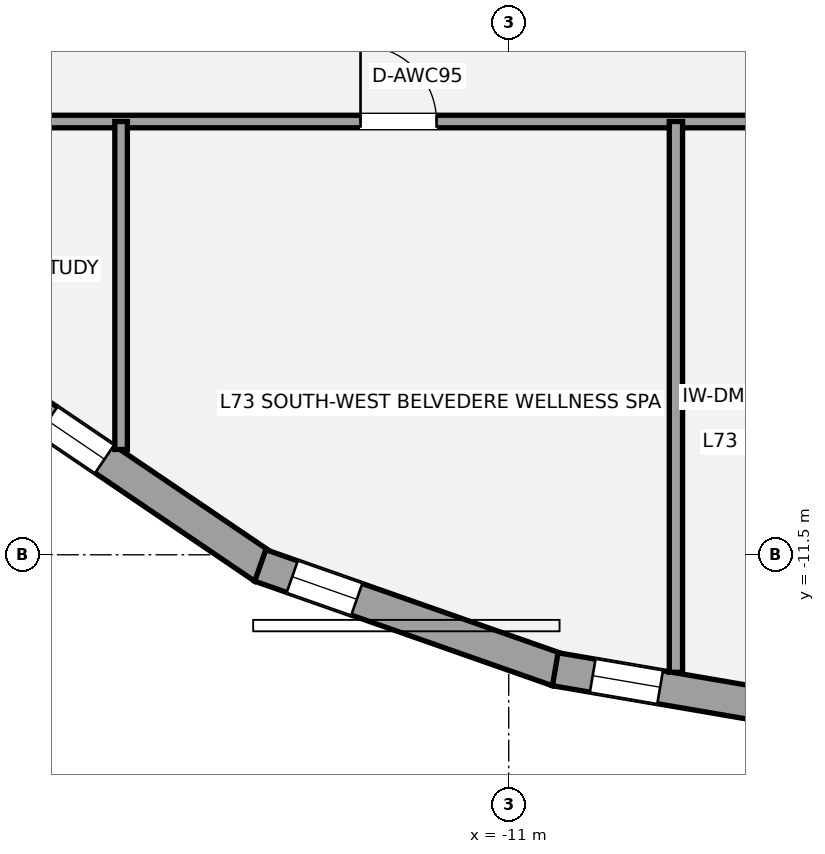
"""IFC4 building model, lengths in metres.
Left out: names, types, materials, properties, quantities, classifications, styles, units other than length and angle.
Written with IfcOpenShell. Run it as: python <this file> out.ifc"""

import sys

from ifc_helpers import new_model, si_unit, direction, frame, frame_2d, origin, place, context, subcontext, project, spatial, rectangle, extrude, element, fill, save


model = new_model("IFC4")
c1 = context("Model", 3, precision=1e-05, world=origin(), true_north=direction((0.0, 1.0)))
c2 = subcontext(c1, "Body", "Model", "MODEL_VIEW")
j1 = project(units=[si_unit("LENGTHUNIT", "METRE"), si_unit("PLANEANGLEUNIT", "RADIAN")], contexts=[c1])
p1 = place(None, origin())
s1 = spatial("IfcSite", under=j1, at=p1, CompositionType="ELEMENT")
p2 = place(p1, origin())
s2 = spatial("IfcBuilding", under=s1, at=p2, CompositionType="ELEMENT")
p3 = place(p2, frame((0.0, 0.0, 257.25)))
s3 = spatial("IfcBuildingStorey", under=s2, at=p3, CompositionType="ELEMENT", Elevation=257.25)
p4 = place(p3, frame((-14.218, -11.666, 0.0), z_axis=(0.0, 0.0, 1.0), x_axis=(-0.827669406477, 0.561215959842, 0.0)))
e1 = element("IfcWall", 1, at=p4, inside=s3, PredefinedType="STANDARD", context=c2, shape_type="SweptSolid", body=[
    extrude(rectangle(XDim=3.786, YDim=0.44, at=frame_2d((1.893, 0.0))), origin(), (0.0, 0.0, 1.0), 2.296),
])
p5 = place(p4, frame((2.537, 0.0, 0.58)))
e2 = element("IfcOpeningElement", 2, at=p5, cuts=e1, PredefinedType="OPENING", context=c2, shape_type="SweptSolid", body=[
    extrude(rectangle(XDim=0.9, YDim=1.35, at=frame_2d((0.45, 0.675))), frame((0.0, 0.23, 0.0), z_axis=(0.0, -1.0, 0.0), x_axis=(1.0, 0.0, 0.0)), (0.0, 0.0, 1.0), 0.46),
])
p6 = place(p3, frame((-10.352, -13.015, 0.0), z_axis=(0.0, 0.0, 1.0), x_axis=(-0.943571934891, 0.331167636834, 0.0)))
e3 = element("IfcWall", 3, at=p6, inside=s3, PredefinedType="STANDARD", context=c2, shape_type="SweptSolid", body=[
    extrude(rectangle(XDim=4.151, YDim=0.44, at=frame_2d((2.076, 0.0))), origin(), (0.0, 0.0, 1.0), 2.296),
])
p7 = place(p6, frame((2.805, 0.0, 0.58)))
e4 = element("IfcOpeningElement", 4, at=p7, cuts=e3, PredefinedType="OPENING", context=c2, shape_type="SweptSolid", body=[
    extrude(rectangle(XDim=0.9, YDim=1.35, at=frame_2d((0.45, 0.675))), frame((0.0, 0.23, 0.0), z_axis=(0.0, -1.0, 0.0), x_axis=(1.0, 0.0, 0.0)), (0.0, 0.0, 1.0), 0.46),
])
p8 = place(p3, frame((-6.2, -13.723, 0.0), z_axis=(0.0, 0.0, 1.0), x_axis=(-0.985667057966, 0.168702254995, 0.0)))
e5 = element("IfcWall", 5, at=p8, inside=s3, PredefinedType="STANDARD", context=c2, shape_type="SweptSolid", body=[
    extrude(rectangle(XDim=4.249, YDim=0.44, at=frame_2d((2.125, 0.0))), origin(), (0.0, 0.0, 1.0), 2.296),
])
p9 = place(p8, frame((2.849, 0.0, 0.58)))
e6 = element("IfcOpeningElement", 6, at=p9, cuts=e5, PredefinedType="OPENING", context=c2, shape_type="SweptSolid", body=[
    extrude(rectangle(XDim=0.9, YDim=1.35, at=frame_2d((0.45, 0.675))), frame((0.0, 0.23, 0.0), z_axis=(0.0, -1.0, 0.0), x_axis=(1.0, 0.0, 0.0)), (0.0, 0.0, 1.0), 0.46),
])
p10 = place(p3, frame((-19.497, -5.8, 0.0), z_axis=(0.0, 0.0, 1.0), x_axis=(1.0, 0.0, 0.0)))
e7 = element("IfcWall", 7, at=p10, inside=s3, PredefinedType="PARTITIONING", context=c2, shape_type="SweptSolid", body=[
    extrude(rectangle(XDim=38.994, YDim=0.165, at=frame_2d((19.497, 0.0))), origin(), (0.0, 0.0, 1.0), 2.383),
])
p11 = place(p10, frame((1.035, 0.0, 0.0)))
e8 = element("IfcOpeningElement", 8, at=p11, cuts=e7, PredefinedType="OPENING", context=c2, shape_type="SweptSolid", body=[
    extrude(rectangle(XDim=1.0, YDim=2.15, at=frame_2d((0.5, 1.075))), frame((0.0, 0.093, 0.0), z_axis=(0.0, -1.0, 0.0), x_axis=(1.0, 0.0, 0.0)), (0.0, 0.0, 1.0), 0.185),
])
p12 = place(p10, frame((36.719, 0.0, 0.0)))
e9 = element("IfcOpeningElement", 9, at=p12, cuts=e7, PredefinedType="OPENING", context=c2, shape_type="SweptSolid", body=[
    extrude(rectangle(XDim=1.0, YDim=2.15, at=frame_2d((0.5, 1.075))), frame((0.0, 0.093, 0.0), z_axis=(0.0, -1.0, 0.0), x_axis=(1.0, 0.0, 0.0)), (0.0, 0.0, 1.0), 0.185),
])
p13 = place(p10, frame((6.548, 0.0, 0.0)))
e10 = element("IfcOpeningElement", 10, at=p13, cuts=e7, PredefinedType="OPENING", context=c2, shape_type="SweptSolid", body=[
    extrude(rectangle(XDim=1.0, YDim=2.15, at=frame_2d((0.5, 1.075))), frame((0.0, 0.093, 0.0), z_axis=(0.0, -1.0, 0.0), x_axis=(1.0, 0.0, 0.0)), (0.0, 0.0, 1.0), 0.185),
])
p14 = place(p10, frame((13.778, 0.0, 0.0)))
e11 = element("IfcOpeningElement", 11, at=p14, cuts=e7, PredefinedType="OPENING", context=c2, shape_type="SweptSolid", body=[
    extrude(rectangle(XDim=1.0, YDim=2.15, at=frame_2d((0.5, 1.075))), frame((0.0, 0.093, 0.0), z_axis=(0.0, -1.0, 0.0), x_axis=(1.0, 0.0, 0.0)), (0.0, 0.0, 1.0), 0.185),
])
p15 = place(p10, frame((19.397, 0.0, 0.0)))
e12 = element("IfcOpeningElement", 12, at=p15, cuts=e7, PredefinedType="OPENING", context=c2, shape_type="SweptSolid", body=[
    extrude(rectangle(XDim=1.0, YDim=2.15, at=frame_2d((0.5, 1.075))), frame((0.0, 0.093, 0.0), z_axis=(0.0, -1.0, 0.0), x_axis=(1.0, 0.0, 0.0)), (0.0, 0.0, 1.0), 0.185),
])
p16 = place(p10, frame((26.018, 0.0, 0.0)))
e13 = element("IfcOpeningElement", 13, at=p16, cuts=e7, PredefinedType="OPENING", context=c2, shape_type="SweptSolid", body=[
    extrude(rectangle(XDim=1.0, YDim=2.15, at=frame_2d((0.5, 1.075))), frame((0.0, 0.093, 0.0), z_axis=(0.0, -1.0, 0.0), x_axis=(1.0, 0.0, 0.0)), (0.0, 0.0, 1.0), 0.185),
])
p17 = place(p10, frame((31.647, 0.0, 0.0)))
e14 = element("IfcOpeningElement", 14, at=p17, cuts=e7, PredefinedType="OPENING", context=c2, shape_type="SweptSolid", body=[
    extrude(rectangle(XDim=1.0, YDim=2.15, at=frame_2d((0.5, 1.075))), frame((0.0, 0.093, 0.0), z_axis=(0.0, -1.0, 0.0), x_axis=(1.0, 0.0, 0.0)), (0.0, 0.0, 1.0), 0.185),
])
p18 = place(p3, frame((-16.1, -10.115, 0.0), z_axis=(0.0, 0.0, 1.0), x_axis=(0.0, 1.0, 0.0)))
e15 = element("IfcWall", 15, at=p18, inside=s3, PredefinedType="PARTITIONING", context=c2, shape_type="SweptSolid", body=[
    extrude(rectangle(XDim=4.314, YDim=0.165, at=frame_2d((2.157, 0.0))), origin(), (0.0, 0.0, 1.0), 2.383),
])
p19 = place(p3, frame((-8.8, -13.046, 0.0), z_axis=(0.0, 0.0, 1.0), x_axis=(0.0, 1.0, 0.0)))
e16 = element("IfcWall", 16, at=p19, inside=s3, PredefinedType="PARTITIONING", context=c2, shape_type="SweptSolid", body=[
    extrude(rectangle(XDim=7.246, YDim=0.175, at=frame_2d((3.623, 0.0))), origin(), (0.0, 0.0, 1.0), 2.93),
])
p20 = place(p5, origin())
e17 = element("IfcWindow", 17, at=p20, inside=s3, PartitioningType="SINGLE_PANEL", PredefinedType="WINDOW", context=c2, shape_type="SweptSolid", body=[
    extrude(rectangle(XDim=0.9, YDim=1.35, at=frame_2d((0.45, 0.675))), frame((0.0, -0.01, 0.0), z_axis=(0.0, -1.0, 0.0), x_axis=(1.0, 0.0, 0.0)), (0.0, 0.0, 1.0), 0.06),
])
fill(e2, e17)
p21 = place(p7, origin())
e18 = element("IfcWindow", 18, at=p21, inside=s3, PartitioningType="SINGLE_PANEL", PredefinedType="WINDOW", context=c2, shape_type="SweptSolid", body=[
    extrude(rectangle(XDim=0.9, YDim=1.35, at=frame_2d((0.45, 0.675))), frame((0.0, -0.01, 0.0), z_axis=(0.0, -1.0, 0.0), x_axis=(1.0, 0.0, 0.0)), (0.0, 0.0, 1.0), 0.06),
])
fill(e4, e18)
p22 = place(p9, origin())
e19 = element("IfcWindow", 19, at=p22, inside=s3, PartitioningType="SINGLE_PANEL", PredefinedType="WINDOW", context=c2, shape_type="SweptSolid", body=[
    extrude(rectangle(XDim=0.9, YDim=1.35, at=frame_2d((0.45, 0.675))), frame((0.0, -0.01, 0.0), z_axis=(0.0, -1.0, 0.0), x_axis=(1.0, 0.0, 0.0)), (0.0, 0.0, 1.0), 0.06),
])
fill(e6, e19)
p23 = place(p13, origin())
e20 = element("IfcDoor", 20, at=p23, inside=s3, OperationType="SINGLE_SWING_LEFT", PredefinedType="DOOR", context=c2, shape_type="SweptSolid", body=[
    extrude(rectangle(XDim=1.0, YDim=2.15, at=frame_2d((0.5, 1.075))), frame((0.0, 0.025, 0.0), z_axis=(0.0, -1.0, 0.0), x_axis=(1.0, 0.0, 0.0)), (0.0, 0.0, 1.0), 0.05),
])
fill(e10, e20)
save(model, sys.argv[1])
